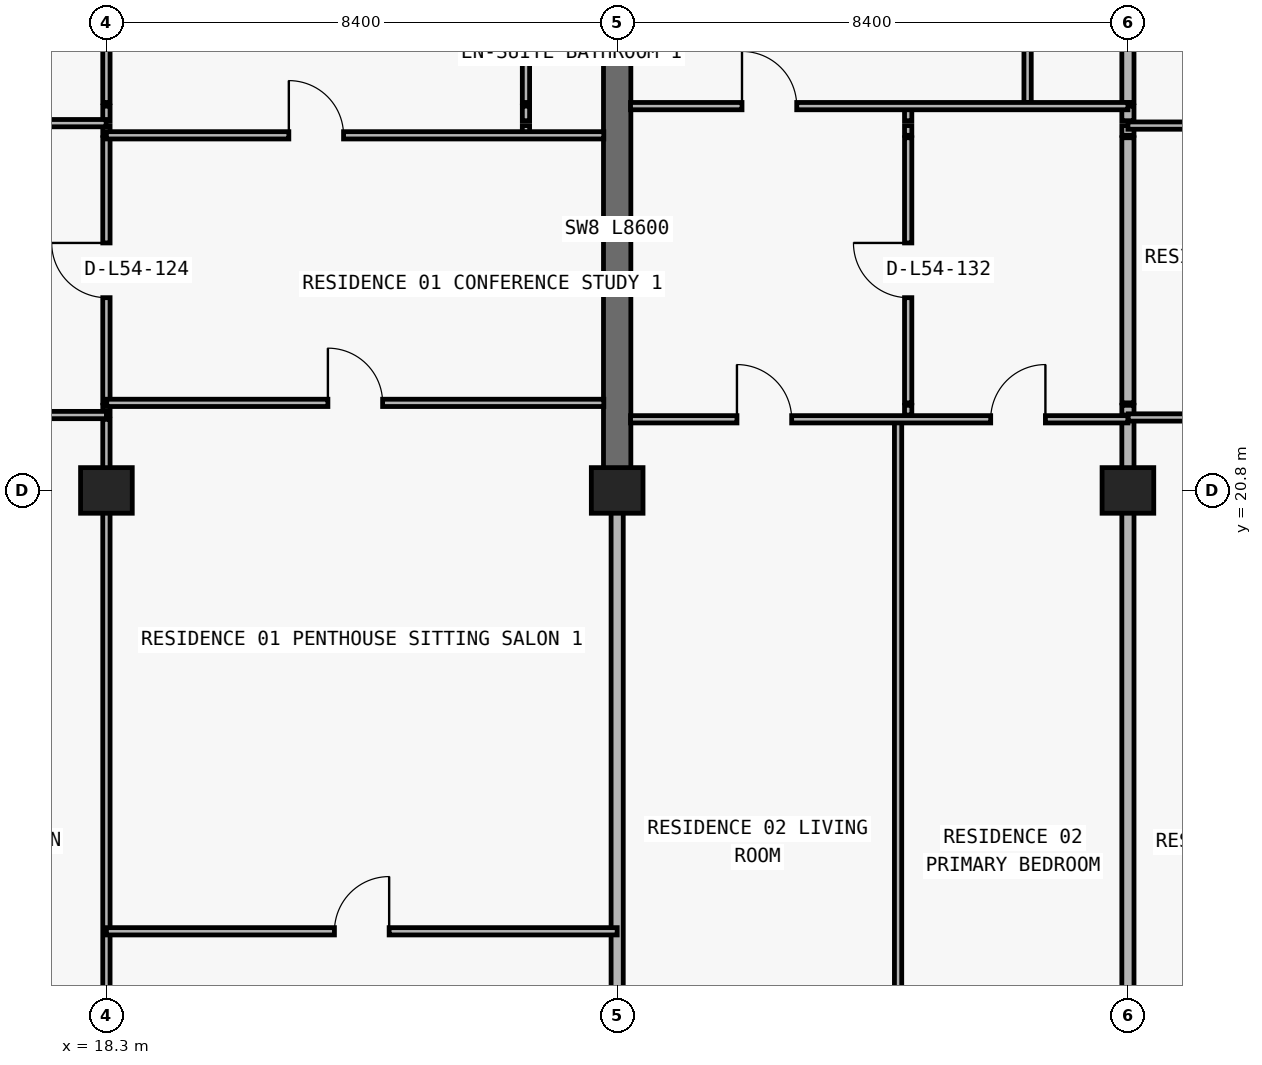
"""IFC4 building model, lengths in metres.
Left out: names, types, materials, properties, quantities, classifications, styles, units other than length and angle.
Written with IfcOpenShell. Run it as: python <this file> out.ifc"""

import sys

from ifc_helpers import new_model, si_unit, direction, frame, frame_2d, origin, origin_2d, place, context, subcontext, project, spatial, rectangle, extrude, element, fill, save


model = new_model("IFC4")
c1 = context("Model", 3, precision=1e-05, world=origin(), true_north=direction((0.0, 1.0)))
c2 = subcontext(c1, "Body", "Model", "MODEL_VIEW")
j1 = project(units=[si_unit("LENGTHUNIT", "METRE"), si_unit("PLANEANGLEUNIT", "RADIAN")], contexts=[c1])
p1 = place(None, origin())
s1 = spatial("IfcSite", under=j1, at=p1, CompositionType="ELEMENT")
p2 = place(p1, origin())
s2 = spatial("IfcBuilding", under=s1, at=p2, CompositionType="ELEMENT")
p3 = place(p2, frame((0.0, 0.0, 195.0)))
s3 = spatial("IfcBuildingStorey", under=s2, at=p3, CompositionType="ELEMENT", Elevation=195.0)
for number, where, z_axis, x_axis in (
    (1, (18.3, 20.8, 0.0), (0.0, 0.0, 1.0), (1.0, 0.0, 0.0)),
    (2, (26.7, 20.8, 0.0), (0.0, 0.0, 1.0), (1.0, 0.0, 0.0)),
    (3, (35.1, 20.8, 0.0), (0.0, 0.0, 1.0), (1.0, 0.0, 0.0)),
):
    element("IfcColumn", number, at=place(p3, frame(where, z_axis=z_axis, x_axis=x_axis)), inside=s3, PredefinedType="COLUMN", context=c2, shape_type="SweptSolid", body=[
        extrude(rectangle(XDim=0.85, YDim=0.75, at=origin_2d()), origin(), (0.0, 0.0, 1.0), 3.05),
    ])
p4 = place(p3, frame((26.7, 20.8, 0.0), z_axis=(0.0, 0.0, 1.0), x_axis=(0.0, 1.0, 0.0)))
e4 = element("IfcWall", 4, at=p4, inside=s3, PredefinedType="SHEAR", context=c2, shape_type="SweptSolid", body=[
    extrude(rectangle(XDim=8.6, YDim=0.45, at=frame_2d((4.3, 0.0))), origin(), (0.0, 0.0, 1.0), 3.05),
])
p5 = place(p3, frame((18.3, 11.24, 0.0), z_axis=(0.0, 0.0, 1.0), x_axis=(0.0, 1.0, 0.0)))
e5 = element("IfcWall", 5, at=p5, inside=s3, PredefinedType="PARTITIONING", context=c2, shape_type="SweptSolid", body=[
    extrude(rectangle(XDim=10.73, YDim=0.12, at=frame_2d((5.365, 0.0))), origin(), (0.0, 0.0, 1.0), 2.263),
])
p6 = place(p3, frame((18.3, 22.04, 0.0), z_axis=(0.0, 0.0, 1.0), x_axis=(0.0, 1.0, 0.0)))
e6 = element("IfcWall", 6, at=p6, inside=s3, PredefinedType="PARTITIONING", context=c2, shape_type="SweptSolid", body=[
    extrude(rectangle(XDim=0.16, YDim=0.12, at=frame_2d((0.08, 0.0))), origin(), (0.0, 0.0, 1.0), 2.263),
])
p7 = place(p3, frame((18.3, 22.24, 0.0), z_axis=(0.0, 0.0, 1.0), x_axis=(0.0, 1.0, 0.0)))
e7 = element("IfcWall", 7, at=p7, inside=s3, PredefinedType="PARTITIONING", context=c2, shape_type="SweptSolid", body=[
    extrude(rectangle(XDim=4.36, YDim=0.12, at=frame_2d((2.18, 0.0))), origin(), (0.0, 0.0, 1.0), 2.263),
])
p8 = place(p7, frame((1.73, 0.0, 0.0)))
e8 = element("IfcOpeningElement", 8, at=p8, cuts=e7, PredefinedType="OPENING", context=c2, shape_type="SweptSolid", body=[
    extrude(rectangle(XDim=0.9, YDim=2.15, at=frame_2d((0.45, 1.075))), frame((0.0, 0.07, 0.0), z_axis=(0.0, -1.0, 0.0), x_axis=(1.0, 0.0, 0.0)), (0.0, 0.0, 1.0), 0.14),
])
p9 = place(p3, frame((18.3, 26.64, 0.0), z_axis=(0.0, 0.0, 1.0), x_axis=(0.0, 1.0, 0.0)))
e9 = element("IfcWall", 9, at=p9, inside=s3, PredefinedType="PARTITIONING", context=c2, shape_type="SweptSolid", body=[
    extrude(rectangle(XDim=0.16, YDim=0.12, at=frame_2d((0.08, 0.0))), origin(), (0.0, 0.0, 1.0), 2.263),
])
p10 = place(p3, frame((18.3, 26.88, 0.0), z_axis=(0.0, 0.0, 1.0), x_axis=(0.0, 1.0, 0.0)))
e10 = element("IfcWall", 10, at=p10, inside=s3, PredefinedType="PARTITIONING", context=c2, shape_type="SweptSolid", body=[
    extrude(rectangle(XDim=0.24, YDim=0.12, at=frame_2d((0.12, 0.0))), origin(), (0.0, 0.0, 1.0), 2.263),
])
p11 = place(p3, frame((18.3, 27.18, 0.0), z_axis=(0.0, 0.0, 1.0), x_axis=(0.0, 1.0, 0.0)))
e11 = element("IfcWall", 11, at=p11, inside=s3, PredefinedType="PARTITIONING", context=c2, shape_type="SweptSolid", body=[
    extrude(rectangle(XDim=6.32, YDim=0.12, at=frame_2d((3.16, 0.0))), origin(), (0.0, 0.0, 1.0), 2.263),
])
p12 = place(p3, frame((25.2, 26.64, 0.0), z_axis=(0.0, 0.0, 1.0), x_axis=(0.0, 1.0, 0.0)))
e12 = element("IfcWall", 12, at=p12, inside=s3, PredefinedType="PARTITIONING", context=c2, shape_type="SweptSolid", body=[
    extrude(rectangle(XDim=0.16, YDim=0.12, at=frame_2d((0.08, 0.0))), origin(), (0.0, 0.0, 1.0), 3.05),
])
p13 = place(p3, frame((25.2, 26.88, 0.0), z_axis=(0.0, 0.0, 1.0), x_axis=(0.0, 1.0, 0.0)))
e13 = element("IfcWall", 13, at=p13, inside=s3, PredefinedType="PARTITIONING", context=c2, shape_type="SweptSolid", body=[
    extrude(rectangle(XDim=0.24, YDim=0.12, at=frame_2d((0.12, 0.0))), origin(), (0.0, 0.0, 1.0), 3.05),
])
p14 = place(p3, frame((25.2, 27.18, 0.0), z_axis=(0.0, 0.0, 1.0), x_axis=(0.0, 1.0, 0.0)))
e14 = element("IfcWall", 14, at=p14, inside=s3, PredefinedType="PARTITIONING", context=c2, shape_type="SweptSolid", body=[
    extrude(rectangle(XDim=6.32, YDim=0.12, at=frame_2d((3.16, 0.0))), origin(), (0.0, 0.0, 1.0), 3.05),
])
p15 = place(p14, frame((3.035, 0.0, 0.0)))
e15 = element("IfcOpeningElement", 15, at=p15, cuts=e14, PredefinedType="OPENING", context=c2, shape_type="SweptSolid", body=[
    extrude(rectangle(XDim=0.85, YDim=2.1, at=frame_2d((0.425, 1.05))), frame((0.0, 0.07, 0.0), z_axis=(0.0, -1.0, 0.0), x_axis=(1.0, 0.0, 0.0)), (0.0, 0.0, 1.0), 0.14),
])
p16 = place(p3, frame((26.7, 11.24, 0.0), z_axis=(0.0, 0.0, 1.0), x_axis=(0.0, 1.0, 0.0)))
e16 = element("IfcWall", 16, at=p16, inside=s3, PredefinedType="PARTITIONING", context=c2, shape_type="SweptSolid", body=[
    extrude(rectangle(XDim=9.555, YDim=0.2, at=frame_2d((4.777, 0.0))), origin(), (0.0, 0.0, 1.0), 2.263),
])
p17 = place(p3, frame((31.32, 11.24, 0.0), z_axis=(0.0, 0.0, 1.0), x_axis=(0.0, 1.0, 0.0)))
e17 = element("IfcWall", 17, at=p17, inside=s3, PredefinedType="PARTITIONING", context=c2, shape_type="SweptSolid", body=[
    extrude(rectangle(XDim=10.73, YDim=0.12, at=frame_2d((5.365, 0.0))), origin(), (0.0, 0.0, 1.0), 3.05),
])
p18 = place(p3, frame((31.486, 22.04, 0.0), z_axis=(0.0, 0.0, 1.0), x_axis=(0.0, 1.0, 0.0)))
e18 = element("IfcWall", 18, at=p18, inside=s3, PredefinedType="PARTITIONING", context=c2, shape_type="SweptSolid", body=[
    extrude(rectangle(XDim=0.16, YDim=0.12, at=frame_2d((0.08, 0.0))), origin(), (0.0, 0.0, 1.0), 3.05),
])
p19 = place(p3, frame((31.486, 22.24, 0.0), z_axis=(0.0, 0.0, 1.0), x_axis=(0.0, 1.0, 0.0)))
e19 = element("IfcWall", 19, at=p19, inside=s3, PredefinedType="PARTITIONING", context=c2, shape_type="SweptSolid", body=[
    extrude(rectangle(XDim=4.36, YDim=0.12, at=frame_2d((2.18, 0.0))), origin(), (0.0, 0.0, 1.0), 3.05),
])
p20 = place(p19, frame((1.73, 0.0, 0.0)))
e20 = element("IfcOpeningElement", 20, at=p20, cuts=e19, PredefinedType="OPENING", context=c2, shape_type="SweptSolid", body=[
    extrude(rectangle(XDim=0.9, YDim=2.15, at=frame_2d((0.45, 1.075))), frame((0.0, 0.07, 0.0), z_axis=(0.0, -1.0, 0.0), x_axis=(1.0, 0.0, 0.0)), (0.0, 0.0, 1.0), 0.14),
])
p21 = place(p3, frame((31.486, 26.64, 0.0), z_axis=(0.0, 0.0, 1.0), x_axis=(0.0, 1.0, 0.0)))
e21 = element("IfcWall", 21, at=p21, inside=s3, PredefinedType="PARTITIONING", context=c2, shape_type="SweptSolid", body=[
    extrude(rectangle(XDim=0.16, YDim=0.12, at=frame_2d((0.08, 0.0))), origin(), (0.0, 0.0, 1.0), 3.05),
])
p22 = place(p3, frame((31.486, 26.88, 0.0), z_axis=(0.0, 0.0, 1.0), x_axis=(0.0, 1.0, 0.0)))
e22 = element("IfcWall", 22, at=p22, inside=s3, PredefinedType="PARTITIONING", context=c2, shape_type="SweptSolid", body=[
    extrude(rectangle(XDim=0.24, YDim=0.12, at=frame_2d((0.12, 0.0))), origin(), (0.0, 0.0, 1.0), 3.05),
])
p23 = place(p3, frame((33.45, 27.18, 0.0), z_axis=(0.0, 0.0, 1.0), x_axis=(0.0, 1.0, 0.0)))
e23 = element("IfcWall", 23, at=p23, inside=s3, PredefinedType="PARTITIONING", context=c2, shape_type="SweptSolid", body=[
    extrude(rectangle(XDim=6.32, YDim=0.12, at=frame_2d((3.16, 0.0))), origin(), (0.0, 0.0, 1.0), 3.05),
])
p24 = place(p23, frame((3.035, 0.0, 0.0)))
e24 = element("IfcOpeningElement", 24, at=p24, cuts=e23, PredefinedType="OPENING", context=c2, shape_type="SweptSolid", body=[
    extrude(rectangle(XDim=0.85, YDim=2.1, at=frame_2d((0.425, 1.05))), frame((0.0, 0.07, 0.0), z_axis=(0.0, -1.0, 0.0), x_axis=(1.0, 0.0, 0.0)), (0.0, 0.0, 1.0), 0.14),
])
p25 = place(p3, frame((35.1, 11.24, 0.0), z_axis=(0.0, 0.0, 1.0), x_axis=(0.0, 1.0, 0.0)))
e25 = element("IfcWall", 25, at=p25, inside=s3, PredefinedType="PARTITIONING", context=c2, shape_type="SweptSolid", body=[
    extrude(rectangle(XDim=10.73, YDim=0.2, at=frame_2d((5.365, 0.0))), origin(), (0.0, 0.0, 1.0), 2.263),
])
p26 = place(p3, frame((35.1, 22.04, 0.0), z_axis=(0.0, 0.0, 1.0), x_axis=(0.0, 1.0, 0.0)))
e26 = element("IfcWall", 26, at=p26, inside=s3, PredefinedType="PARTITIONING", context=c2, shape_type="SweptSolid", body=[
    extrude(rectangle(XDim=0.16, YDim=0.2, at=frame_2d((0.08, 0.0))), origin(), (0.0, 0.0, 1.0), 2.263),
])
p27 = place(p3, frame((35.1, 22.24, 0.0), z_axis=(0.0, 0.0, 1.0), x_axis=(0.0, 1.0, 0.0)))
e27 = element("IfcWall", 27, at=p27, inside=s3, PredefinedType="PARTITIONING", context=c2, shape_type="SweptSolid", body=[
    extrude(rectangle(XDim=4.36, YDim=0.2, at=frame_2d((2.18, 0.0))), origin(), (0.0, 0.0, 1.0), 2.263),
])
p28 = place(p3, frame((35.1, 26.64, 0.0), z_axis=(0.0, 0.0, 1.0), x_axis=(0.0, 1.0, 0.0)))
e28 = element("IfcWall", 28, at=p28, inside=s3, PredefinedType="PARTITIONING", context=c2, shape_type="SweptSolid", body=[
    extrude(rectangle(XDim=0.16, YDim=0.2, at=frame_2d((0.08, 0.0))), origin(), (0.0, 0.0, 1.0), 2.263),
])
p29 = place(p3, frame((35.1, 26.88, 0.0), z_axis=(0.0, 0.0, 1.0), x_axis=(0.0, 1.0, 0.0)))
e29 = element("IfcWall", 29, at=p29, inside=s3, PredefinedType="PARTITIONING", context=c2, shape_type="SweptSolid", body=[
    extrude(rectangle(XDim=0.24, YDim=0.2, at=frame_2d((0.12, 0.0))), origin(), (0.0, 0.0, 1.0), 2.263),
])
p30 = place(p3, frame((35.1, 27.18, 0.0), z_axis=(0.0, 0.0, 1.0), x_axis=(0.0, 1.0, 0.0)))
e30 = element("IfcWall", 30, at=p30, inside=s3, PredefinedType="PARTITIONING", context=c2, shape_type="SweptSolid", body=[
    extrude(rectangle(XDim=6.32, YDim=0.2, at=frame_2d((3.16, 0.0))), origin(), (0.0, 0.0, 1.0), 2.263),
])
p31 = place(p3, frame((18.3, 13.55, 0.0), z_axis=(0.0, 0.0, 1.0), x_axis=(1.0, 0.0, 0.0)))
e31 = element("IfcWall", 31, at=p31, inside=s3, PredefinedType="PARTITIONING", context=c2, shape_type="SweptSolid", body=[
    extrude(rectangle(XDim=8.4, YDim=0.12, at=frame_2d((4.2, 0.0))), origin(), (0.0, 0.0, 1.0), 3.05),
])
p32 = place(p31, frame((3.75, 0.0, 0.0)))
e32 = element("IfcOpeningElement", 32, at=p32, cuts=e31, PredefinedType="OPENING", context=c2, shape_type="SweptSolid", body=[
    extrude(rectangle(XDim=0.9, YDim=2.15, at=frame_2d((0.45, 1.075))), frame((0.0, 0.07, 0.0), z_axis=(0.0, -1.0, 0.0), x_axis=(1.0, 0.0, 0.0)), (0.0, 0.0, 1.0), 0.14),
])
p33 = place(p3, frame((26.92, 21.97, 0.0), z_axis=(0.0, 0.0, 1.0), x_axis=(1.0, 0.0, 0.0)))
e33 = element("IfcWall", 33, at=p33, inside=s3, PredefinedType="PARTITIONING", context=c2, shape_type="SweptSolid", body=[
    extrude(rectangle(XDim=8.18, YDim=0.12, at=frame_2d((4.09, 0.0))), origin(), (0.0, 0.0, 1.0), 3.05),
])
p34 = place(p33, frame((1.75, 0.0, 0.0)))
e34 = element("IfcOpeningElement", 34, at=p34, cuts=e33, PredefinedType="OPENING", context=c2, shape_type="SweptSolid", body=[
    extrude(rectangle(XDim=0.9, YDim=2.15, at=frame_2d((0.45, 1.075))), frame((0.0, 0.07, 0.0), z_axis=(0.0, -1.0, 0.0), x_axis=(1.0, 0.0, 0.0)), (0.0, 0.0, 1.0), 0.14),
])
p35 = place(p33, frame((5.923, 0.0, 0.0)))
e35 = element("IfcOpeningElement", 35, at=p35, cuts=e33, PredefinedType="OPENING", context=c2, shape_type="SweptSolid", body=[
    extrude(rectangle(XDim=0.9, YDim=2.15, at=frame_2d((0.45, 1.075))), frame((0.0, 0.07, 0.0), z_axis=(0.0, -1.0, 0.0), x_axis=(1.0, 0.0, 0.0)), (0.0, 0.0, 1.0), 0.14),
])
p36 = place(p3, frame((35.105, 22.0, 0.0), z_axis=(0.0, 0.0, 1.0), x_axis=(1.0, 0.0, 0.0)))
e36 = element("IfcWall", 36, at=p36, inside=s3, PredefinedType="PARTITIONING", context=c2, shape_type="SweptSolid", body=[
    extrude(rectangle(XDim=7.595, YDim=0.12, at=frame_2d((3.797, 0.0))), origin(), (0.0, 0.0, 1.0), 3.05),
])
p37 = place(p36, frame((3.347, 0.0, 0.0)))
e37 = element("IfcOpeningElement", 37, at=p37, cuts=e36, PredefinedType="OPENING", context=c2, shape_type="SweptSolid", body=[
    extrude(rectangle(XDim=0.9, YDim=2.15, at=frame_2d((0.45, 1.075))), frame((0.0, 0.07, 0.0), z_axis=(0.0, -1.0, 0.0), x_axis=(1.0, 0.0, 0.0)), (0.0, 0.0, 1.0), 0.14),
])
p38 = place(p3, frame((10.1, 22.04, 0.0), z_axis=(0.0, 0.0, 1.0), x_axis=(1.0, 0.0, 0.0)))
e38 = element("IfcWall", 38, at=p38, inside=s3, PredefinedType="PARTITIONING", context=c2, shape_type="SweptSolid", body=[
    extrude(rectangle(XDim=8.2, YDim=0.12, at=frame_2d((4.1, 0.0))), origin(), (0.0, 0.0, 1.0), 3.05),
])
p39 = place(p38, frame((3.65, 0.0, 0.0)))
e39 = element("IfcOpeningElement", 39, at=p39, cuts=e38, PredefinedType="OPENING", context=c2, shape_type="SweptSolid", body=[
    extrude(rectangle(XDim=0.9, YDim=2.15, at=frame_2d((0.45, 1.075))), frame((0.0, 0.07, 0.0), z_axis=(0.0, -1.0, 0.0), x_axis=(1.0, 0.0, 0.0)), (0.0, 0.0, 1.0), 0.14),
])
p40 = place(p3, frame((18.305, 22.24, 0.0), z_axis=(0.0, 0.0, 1.0), x_axis=(1.0, 0.0, 0.0)))
e40 = element("IfcWall", 40, at=p40, inside=s3, PredefinedType="PARTITIONING", context=c2, shape_type="SweptSolid", body=[
    extrude(rectangle(XDim=8.175, YDim=0.12, at=frame_2d((4.087, 0.0))), origin(), (0.0, 0.0, 1.0), 3.05),
])
p41 = place(p40, frame((3.637, 0.0, 0.0)))
e41 = element("IfcOpeningElement", 41, at=p41, cuts=e40, PredefinedType="OPENING", context=c2, shape_type="SweptSolid", body=[
    extrude(rectangle(XDim=0.9, YDim=2.15, at=frame_2d((0.45, 1.075))), frame((0.0, 0.07, 0.0), z_axis=(0.0, -1.0, 0.0), x_axis=(1.0, 0.0, 0.0)), (0.0, 0.0, 1.0), 0.14),
])
p42 = place(p3, frame((18.3, 26.64, 0.0), z_axis=(0.0, 0.0, 1.0), x_axis=(1.0, 0.0, 0.0)))
e42 = element("IfcWall", 42, at=p42, inside=s3, PredefinedType="PARTITIONING", context=c2, shape_type="SweptSolid", body=[
    extrude(rectangle(XDim=8.18, YDim=0.12, at=frame_2d((4.09, 0.0))), origin(), (0.0, 0.0, 1.0), 3.05),
])
p43 = place(p42, frame((3.0, 0.0, 0.0)))
e43 = element("IfcOpeningElement", 43, at=p43, cuts=e42, PredefinedType="OPENING", context=c2, shape_type="SweptSolid", body=[
    extrude(rectangle(XDim=0.9, YDim=2.15, at=frame_2d((0.45, 1.075))), frame((0.0, 0.07, 0.0), z_axis=(0.0, -1.0, 0.0), x_axis=(1.0, 0.0, 0.0)), (0.0, 0.0, 1.0), 0.14),
])
p44 = place(p3, frame((35.1, 26.8, 0.0), z_axis=(0.0, 0.0, 1.0), x_axis=(1.0, 0.0, 0.0)))
e44 = element("IfcWall", 44, at=p44, inside=s3, PredefinedType="PARTITIONING", context=c2, shape_type="SweptSolid", body=[
    extrude(rectangle(XDim=7.595, YDim=0.12, at=frame_2d((3.797, 0.0))), origin(), (0.0, 0.0, 1.0), 3.05),
])
p45 = place(p44, frame((2.582, 0.0, 0.0)))
e45 = element("IfcOpeningElement", 45, at=p45, cuts=e44, PredefinedType="OPENING", context=c2, shape_type="SweptSolid", body=[
    extrude(rectangle(XDim=0.9, YDim=2.15, at=frame_2d((0.45, 1.075))), frame((0.0, 0.07, 0.0), z_axis=(0.0, -1.0, 0.0), x_axis=(1.0, 0.0, 0.0)), (0.0, 0.0, 1.0), 0.14),
])
p46 = place(p3, frame((10.1, 26.84, 0.0), z_axis=(0.0, 0.0, 1.0), x_axis=(1.0, 0.0, 0.0)))
e46 = element("IfcWall", 46, at=p46, inside=s3, PredefinedType="PARTITIONING", context=c2, shape_type="SweptSolid", body=[
    extrude(rectangle(XDim=8.195, YDim=0.12, at=frame_2d((4.097, 0.0))), origin(), (0.0, 0.0, 1.0), 3.05),
])
p47 = place(p46, frame((2.876, 0.0, 0.0)))
e47 = element("IfcOpeningElement", 47, at=p47, cuts=e46, PredefinedType="OPENING", context=c2, shape_type="SweptSolid", body=[
    extrude(rectangle(XDim=0.9, YDim=2.15, at=frame_2d((0.45, 1.075))), frame((0.0, 0.07, 0.0), z_axis=(0.0, -1.0, 0.0), x_axis=(1.0, 0.0, 0.0)), (0.0, 0.0, 1.0), 0.14),
])
p48 = place(p3, frame((26.92, 27.12, 0.0), z_axis=(0.0, 0.0, 1.0), x_axis=(1.0, 0.0, 0.0)))
e48 = element("IfcWall", 48, at=p48, inside=s3, PredefinedType="PARTITIONING", context=c2, shape_type="SweptSolid", body=[
    extrude(rectangle(XDim=8.18, YDim=0.12, at=frame_2d((4.09, 0.0))), origin(), (0.0, 0.0, 1.0), 3.05),
])
p49 = place(p48, frame((1.833, 0.0, 0.0)))
e49 = element("IfcOpeningElement", 49, at=p49, cuts=e48, PredefinedType="OPENING", context=c2, shape_type="SweptSolid", body=[
    extrude(rectangle(XDim=0.9, YDim=2.15, at=frame_2d((0.45, 1.075))), frame((0.0, 0.07, 0.0), z_axis=(0.0, -1.0, 0.0), x_axis=(1.0, 0.0, 0.0)), (0.0, 0.0, 1.0), 0.14),
])
p50 = place(p8, origin())
e50 = element("IfcDoor", 50, at=p50, inside=s3, OperationType="SINGLE_SWING_RIGHT", PredefinedType="DOOR", context=c2, shape_type="SweptSolid", body=[
    extrude(rectangle(XDim=0.9, YDim=2.15, at=frame_2d((0.45, 1.075))), frame((0.0, 0.025, 0.0), z_axis=(0.0, -1.0, 0.0), x_axis=(1.0, 0.0, 0.0)), (0.0, 0.0, 1.0), 0.05),
])
fill(e8, e50)
p51 = place(p43, origin())
e51 = element("IfcDoor", 51, at=p51, inside=s3, OperationType="SINGLE_SWING_LEFT", PredefinedType="DOOR", context=c2, shape_type="SweptSolid", body=[
    extrude(rectangle(XDim=0.9, YDim=2.15, at=frame_2d((0.45, 1.075))), frame((0.0, 0.025, 0.0), z_axis=(0.0, -1.0, 0.0), x_axis=(1.0, 0.0, 0.0)), (0.0, 0.0, 1.0), 0.05),
])
fill(e43, e51)
p52 = place(p41, origin())
e52 = element("IfcDoor", 52, at=p52, inside=s3, OperationType="SINGLE_SWING_LEFT", PredefinedType="DOOR", context=c2, shape_type="SweptSolid", body=[
    extrude(rectangle(XDim=0.9, YDim=2.15, at=frame_2d((0.45, 1.075))), frame((0.0, 0.025, 0.0), z_axis=(0.0, -1.0, 0.0), x_axis=(1.0, 0.0, 0.0)), (0.0, 0.0, 1.0), 0.05),
])
fill(e41, e52)
p53 = place(p32, origin())
e53 = element("IfcDoor", 53, at=p53, inside=s3, OperationType="SINGLE_SWING_RIGHT", PredefinedType="DOOR", context=c2, shape_type="SweptSolid", body=[
    extrude(rectangle(XDim=0.9, YDim=2.15, at=frame_2d((0.45, 1.075))), frame((0.0, 0.025, 0.0), z_axis=(0.0, -1.0, 0.0), x_axis=(1.0, 0.0, 0.0)), (0.0, 0.0, 1.0), 0.05),
])
fill(e32, e53)
p54 = place(p49, origin())
e54 = element("IfcDoor", 54, at=p54, inside=s3, OperationType="SINGLE_SWING_LEFT", PredefinedType="DOOR", context=c2, shape_type="SweptSolid", body=[
    extrude(rectangle(XDim=0.9, YDim=2.15, at=frame_2d((0.45, 1.075))), frame((0.0, 0.025, 0.0), z_axis=(0.0, -1.0, 0.0), x_axis=(1.0, 0.0, 0.0)), (0.0, 0.0, 1.0), 0.05),
])
fill(e49, e54)
p55 = place(p20, origin())
e55 = element("IfcDoor", 55, at=p55, inside=s3, OperationType="SINGLE_SWING_RIGHT", PredefinedType="DOOR", context=c2, shape_type="SweptSolid", body=[
    extrude(rectangle(XDim=0.9, YDim=2.15, at=frame_2d((0.45, 1.075))), frame((0.0, 0.025, 0.0), z_axis=(0.0, -1.0, 0.0), x_axis=(1.0, 0.0, 0.0)), (0.0, 0.0, 1.0), 0.05),
])
fill(e20, e55)
p56 = place(p34, origin())
e56 = element("IfcDoor", 56, at=p56, inside=s3, OperationType="SINGLE_SWING_LEFT", PredefinedType="DOOR", context=c2, shape_type="SweptSolid", body=[
    extrude(rectangle(XDim=0.9, YDim=2.15, at=frame_2d((0.45, 1.075))), frame((0.0, 0.025, 0.0), z_axis=(0.0, -1.0, 0.0), x_axis=(1.0, 0.0, 0.0)), (0.0, 0.0, 1.0), 0.05),
])
fill(e34, e56)
p57 = place(p35, origin())
e57 = element("IfcDoor", 57, at=p57, inside=s3, OperationType="SINGLE_SWING_RIGHT", PredefinedType="DOOR", context=c2, shape_type="SweptSolid", body=[
    extrude(rectangle(XDim=0.9, YDim=2.15, at=frame_2d((0.45, 1.075))), frame((0.0, 0.025, 0.0), z_axis=(0.0, -1.0, 0.0), x_axis=(1.0, 0.0, 0.0)), (0.0, 0.0, 1.0), 0.05),
])
fill(e35, e57)
save(model, sys.argv[1])
